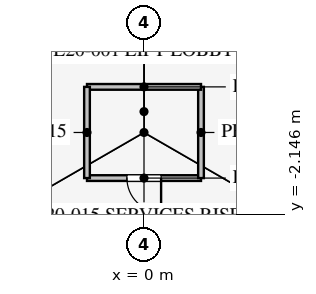
"""IFC4 building model, lengths in metres.
Left out: names, types, materials, properties, quantities, classifications, styles, units other than length and angle.
Written with IfcOpenShell. Run it as: python <this file> out.ifc"""

import sys

from ifc_helpers import new_model, si_unit, direction, frame, frame_2d, origin, place, context, subcontext, project, spatial, rectangle, extrude, element, fill, save


model = new_model("IFC4")
c1 = context("Model", 3, precision=1e-05, world=origin(), true_north=direction((0.0, 1.0)))
c2 = subcontext(c1, "Body", "Model", "MODEL_VIEW")
j1 = project(units=[si_unit("LENGTHUNIT", "METRE"), si_unit("PLANEANGLEUNIT", "RADIAN")], contexts=[c1])
p1 = place(None, origin())
s1 = spatial("IfcSite", under=j1, at=p1, CompositionType="ELEMENT")
p2 = place(p1, origin())
s2 = spatial("IfcBuilding", under=s1, at=p2, CompositionType="ELEMENT")
p3 = place(p2, frame((0.0, 0.0, 87.9)))
s3 = spatial("IfcBuildingStorey", under=s2, at=p3, CompositionType="ELEMENT", Elevation=87.9)
p4 = place(p3, frame((-1.5, -1.2, 0.0), z_axis=(0.0, 0.0, 1.0), x_axis=(1.0, 0.0, 0.0)))
e1 = element("IfcWall", 1, at=p4, inside=s3, PredefinedType="PARTITIONING", context=c2, shape_type="SweptSolid", body=[
    extrude(rectangle(XDim=3.0, YDim=0.15, at=frame_2d((1.5, 0.0))), origin(), (0.0, 0.0, 1.0), 3.95),
])
p5 = place(p4, frame((1.05, 0.0, 0.0)))
e2 = element("IfcOpeningElement", 2, at=p5, cuts=e1, PredefinedType="OPENING", context=c2, shape_type="SweptSolid", body=[
    extrude(rectangle(XDim=0.9, YDim=2.1, at=frame_2d((0.45, 1.05))), frame((0.0, 0.085, 0.0), z_axis=(0.0, -1.0, 0.0), x_axis=(1.0, 0.0, 0.0)), (0.0, 0.0, 1.0), 0.17),
])
p6 = place(p3, frame((1.5, -1.2, 0.0), z_axis=(0.0, 0.0, 1.0), x_axis=(0.0, 1.0, 0.0)))
e3 = element("IfcWall", 3, at=p6, inside=s3, PredefinedType="PARTITIONING", context=c2, shape_type="SweptSolid", body=[
    extrude(rectangle(XDim=2.4, YDim=0.15, at=frame_2d((1.2, 0.0))), origin(), (0.0, 0.0, 1.0), 3.95),
])
p7 = place(p3, frame((1.5, 1.2, 0.0), z_axis=(0.0, 0.0, 1.0), x_axis=(-1.0, 0.0, 0.0)))
e4 = element("IfcWall", 4, at=p7, inside=s3, PredefinedType="PARTITIONING", context=c2, shape_type="SweptSolid", body=[
    extrude(rectangle(XDim=3.0, YDim=0.15, at=frame_2d((1.5, 0.0))), origin(), (0.0, 0.0, 1.0), 3.95),
])
p8 = place(p3, frame((-1.5, 1.2, 0.0), z_axis=(0.0, 0.0, 1.0), x_axis=(0.0, -1.0, 0.0)))
e5 = element("IfcWall", 5, at=p8, inside=s3, PredefinedType="PARTITIONING", context=c2, shape_type="SweptSolid", body=[
    extrude(rectangle(XDim=2.4, YDim=0.15, at=frame_2d((1.2, 0.0))), origin(), (0.0, 0.0, 1.0), 3.95),
])
p9 = place(p5, frame((0.9, 0.0, 0.0), z_axis=(0.0, 0.0, 1.0), x_axis=(-1.0, 0.0, 0.0)))
e6 = element("IfcDoor", 6, at=p9, inside=s3, OperationType="SINGLE_SWING_LEFT", PredefinedType="DOOR", context=c2, shape_type="SweptSolid", body=[
    extrude(rectangle(XDim=0.9, YDim=2.1, at=frame_2d((0.45, 1.05))), frame((0.0, 0.025, 0.0), z_axis=(0.0, -1.0, 0.0), x_axis=(1.0, 0.0, 0.0)), (0.0, 0.0, 1.0), 0.05),
])
fill(e2, e6)
save(model, sys.argv[1])
